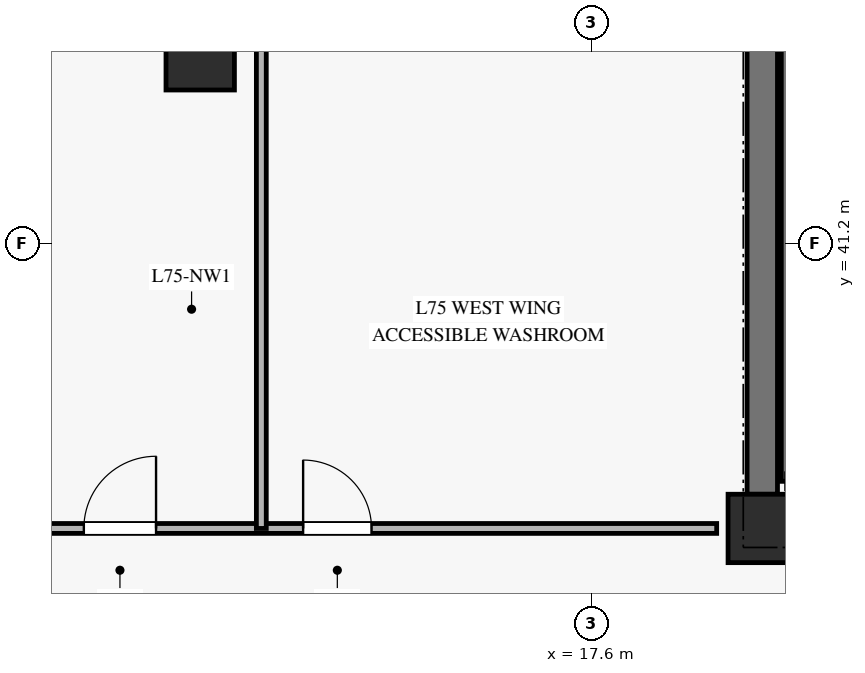
"""IFC4 building model, lengths in metres.
Left out: names, types, materials, properties, quantities, classifications, styles, units other than length and angle.
Written with IfcOpenShell. Run it as: python <this file> out.ifc"""

import sys

from ifc_helpers import new_model, si_unit, direction, frame, frame_2d, origin, origin_2d, place, context, subcontext, project, spatial, rectangle, hollow_rectangle, extrude, source, transform, mapped, element, fill, save


model = new_model("IFC4")
c1 = context("Model", 3, precision=1e-05, world=origin(), true_north=direction((0.0, 1.0)))
c2 = subcontext(c1, "Body", "Model", "MODEL_VIEW")
j1 = project(units=[si_unit("LENGTHUNIT", "METRE"), si_unit("PLANEANGLEUNIT", "RADIAN")], contexts=[c1])
p1 = place(None, origin())
s1 = spatial("IfcSite", under=j1, at=p1, CompositionType="ELEMENT")
p2 = place(p1, origin())
s2 = spatial("IfcBuilding", under=s1, at=p2, CompositionType="ELEMENT")
p3 = place(p2, frame((0.0, 0.0, 293.8)))
s3 = spatial("IfcBuildingStorey", under=s2, at=p3, CompositionType="ELEMENT", Elevation=293.8)
m1 = source(origin(), c2, "Body", "SweptSolid", [
    extrude(rectangle(XDim=0.9, YDim=0.9, at=origin_2d()), origin(), (0.0, 0.0, 1.0), 3.185),
])
p4 = place(p3, frame((19.85, 37.45, 0.0), z_axis=(0.0, 0.0, 1.0), x_axis=(1.0, 0.0, 0.0)))
e1 = element("IfcColumn", 1, at=p4, inside=s3, PredefinedType="PILASTER", context=c2, shape_type="MappedRepresentation", body=[
    mapped(m1, transform((0.0, 0.0, 0.0), x_axis=(1.0, 0.0, 0.0), y_axis=(0.0, 1.0, 0.0), z_axis=(0.0, 0.0, 1.0), scale=1.0)),
])
p5 = place(p3, frame((19.85, 37.9, 0.0), z_axis=(0.0, 0.0, 1.0), x_axis=(0.0, 1.0, 0.0)))
e2 = element("IfcWall", 2, at=p5, inside=s3, PredefinedType="SHEAR", context=c2, shape_type="SweptSolid", body=[
    extrude(rectangle(XDim=8.2, YDim=0.4, at=frame_2d((4.1, 0.0))), origin(), (0.0, 0.0, 1.0), 3.185),
])
m2 = source(origin(), c2, "Body", "SweptSolid", [
    extrude(hollow_rectangle(XDim=0.9, YDim=0.9, WallThickness=0.04, at=origin_2d()), origin(), (0.0, 0.0, 1.0), 3.185),
])
p6 = place(p3, frame((12.455, 43.669, 0.0), z_axis=(0.0, 0.0, 1.0), x_axis=(1.0, 0.0, 0.0)))
e3 = element("IfcColumn", 3, at=p6, inside=s3, PredefinedType="COLUMN", context=c2, shape_type="MappedRepresentation", body=[
    mapped(m2, transform((0.0, 0.0, 0.0), x_axis=(1.0, 0.0, 0.0), y_axis=(0.0, 1.0, 0.0), z_axis=(0.0, 0.0, 1.0), scale=1.0)),
])
p7 = place(p3, frame((12.23, 46.25, 0.0), z_axis=(0.0, 0.0, 1.0), x_axis=(-0.649724860602, -0.76016945842, 0.0)))
e4 = element("IfcWall", 4, at=p7, inside=s3, PredefinedType="SOLIDWALL", context=c2, shape_type="SweptSolid", body=[
    extrude(rectangle(XDim=3.395, YDim=0.3, at=frame_2d((1.698, 0.0))), origin(), (0.0, 0.0, 1.0), 2.815),
])
p8 = place(p7, frame((0.898, 0.0, 0.45)))
e5 = element("IfcOpeningElement", 5, at=p8, cuts=e4, PredefinedType="OPENING", context=c2, shape_type="SweptSolid", body=[
    extrude(rectangle(XDim=1.6, YDim=2.0, at=frame_2d((0.8, 1.0))), frame((0.0, 0.16, 0.0), z_axis=(0.0, -1.0, 0.0), x_axis=(1.0, 0.0, 0.0)), (0.0, 0.0, 1.0), 0.32),
])
p9 = place(p3, frame((20.17, 38.07, 0.0), z_axis=(0.0, 0.0, 1.0), x_axis=(0.0, 1.0, 0.0)))
e6 = element("IfcWall", 6, at=p9, inside=s3, PredefinedType="SOLIDWALL", context=c2, shape_type="SweptSolid", body=[
    extrude(rectangle(XDim=7.25, YDim=0.14, at=frame_2d((3.625, 0.0))), origin(), (0.0, 0.0, 1.0), 3.4),
])
p10 = place(p3, frame((10.024, 37.45, 0.0), z_axis=(0.0, 0.0, 1.0), x_axis=(1.0, 0.0, 0.0)))
e7 = element("IfcWall", 7, at=p10, inside=s3, PredefinedType="PARTITIONING", context=c2, shape_type="SweptSolid", body=[
    extrude(rectangle(XDim=9.226, YDim=0.13, at=frame_2d((4.613, 0.0))), origin(), (0.0, 0.0, 1.0), 2.82),
])
p11 = place(p10, frame((0.9, 0.0, 0.0)))
e8 = element("IfcOpeningElement", 8, at=p11, cuts=e7, PredefinedType="OPENING", context=c2, shape_type="SweptSolid", body=[
    extrude(rectangle(XDim=0.95, YDim=2.1, at=frame_2d((0.475, 1.05))), frame((0.0, 0.075, 0.0), z_axis=(0.0, -1.0, 0.0), x_axis=(1.0, 0.0, 0.0)), (0.0, 0.0, 1.0), 0.15),
])
p12 = place(p10, frame((3.785, 0.0, 0.0)))
e9 = element("IfcOpeningElement", 9, at=p12, cuts=e7, PredefinedType="OPENING", context=c2, shape_type="SweptSolid", body=[
    extrude(rectangle(XDim=0.9, YDim=2.1, at=frame_2d((0.45, 1.05))), frame((0.0, 0.075, 0.0), z_axis=(0.0, -1.0, 0.0), x_axis=(1.0, 0.0, 0.0)), (0.0, 0.0, 1.0), 0.15),
])
p13 = place(p3, frame((13.259, 37.45, 0.0), z_axis=(0.0, 0.0, 1.0), x_axis=(0.0, 1.0, 0.0)))
e10 = element("IfcWall", 10, at=p13, inside=s3, PredefinedType="PARTITIONING", context=c2, shape_type="SweptSolid", body=[
    extrude(rectangle(XDim=8.8, YDim=0.13, at=frame_2d((4.4, 0.0))), origin(), (0.0, 0.0, 1.0), 3.185),
])
m3 = source(origin(), c2, "Body", "SweptSolid", [
    extrude(rectangle(XDim=0.95, YDim=2.1, at=frame_2d((0.475, 1.05))), frame((0.0, 0.025, 0.0), z_axis=(0.0, -1.0, 0.0), x_axis=(1.0, 0.0, 0.0)), (0.0, 0.0, 1.0), 0.05),
])
p14 = place(p11, origin())
e11 = element("IfcDoor", 11, at=p14, inside=s3, OperationType="SINGLE_SWING_RIGHT", PredefinedType="DOOR", context=c2, shape_type="MappedRepresentation", body=[
    mapped(m3, transform((0.0, 0.0, 0.0), x_axis=(1.0, 0.0, 0.0), y_axis=(0.0, 1.0, 0.0), z_axis=(0.0, 0.0, 1.0), scale=1.0)),
])
fill(e8, e11)
m4 = source(origin(), c2, "Body", "SweptSolid", [
    extrude(rectangle(XDim=0.9, YDim=2.1, at=frame_2d((0.45, 1.05))), frame((0.0, 0.025, 0.0), z_axis=(0.0, -1.0, 0.0), x_axis=(1.0, 0.0, 0.0)), (0.0, 0.0, 1.0), 0.05),
])
p15 = place(p12, origin())
e12 = element("IfcDoor", 12, at=p15, inside=s3, OperationType="SINGLE_SWING_LEFT", PredefinedType="DOOR", context=c2, shape_type="MappedRepresentation", body=[
    mapped(m4, transform((0.0, 0.0, 0.0), x_axis=(1.0, 0.0, 0.0), y_axis=(0.0, 1.0, 0.0), z_axis=(0.0, 0.0, 1.0), scale=1.0)),
])
fill(e9, e12)
save(model, sys.argv[1])
